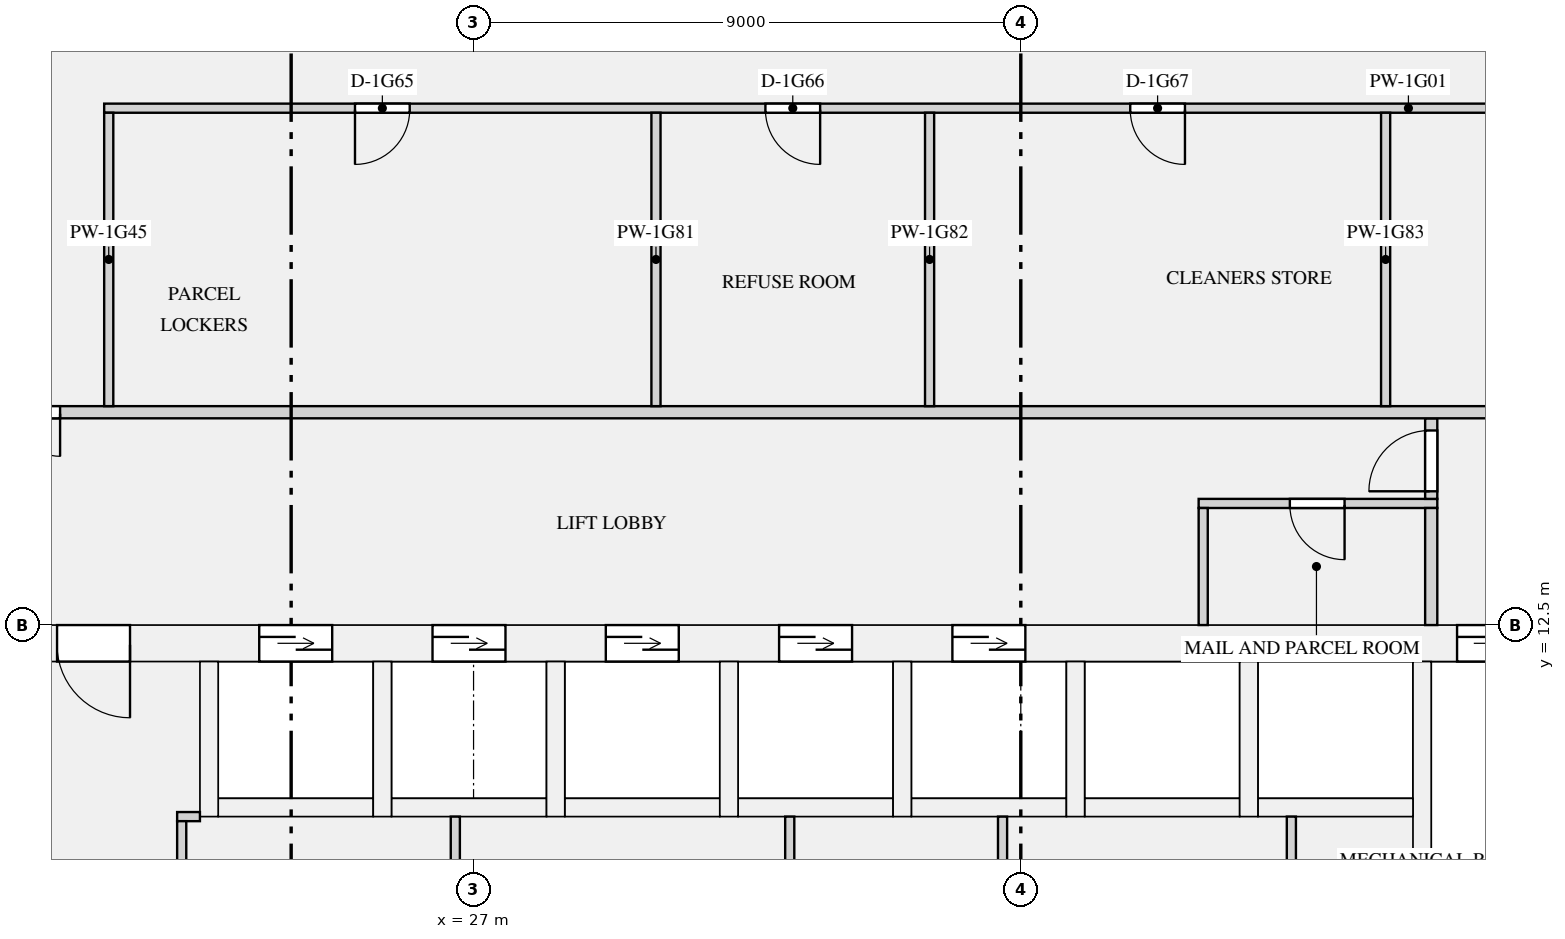
"""IFC4 building model, lengths in metres.
Left out: names, types, materials, properties, quantities, classifications, styles, units other than length and angle.
Written with IfcOpenShell. Run it as: python <this file> out.ifc"""

import sys

from ifc_helpers import new_model, si_unit, direction, frame, frame_2d, origin, place, context, subcontext, project, spatial, rectangle, extrude, element, fill, save


model = new_model("IFC4")
c1 = context("Model", 3, precision=1e-05, world=origin(), true_north=direction((0.0, 1.0)))
c2 = subcontext(c1, "Body", "Model", "MODEL_VIEW")
j1 = project(units=[si_unit("LENGTHUNIT", "METRE"), si_unit("PLANEANGLEUNIT", "RADIAN")], contexts=[c1])
p1 = place(None, origin())
s1 = spatial("IfcSite", under=j1, at=p1, CompositionType="ELEMENT")
p2 = place(p1, origin())
s2 = spatial("IfcBuilding", under=s1, at=p2, CompositionType="ELEMENT")
p3 = place(p2, frame((0.0, 0.0, 69.9)))
s3 = spatial("IfcBuildingStorey", under=s2, at=p3, CompositionType="ELEMENT", Elevation=69.9)
p4 = place(p3, frame((19.0, 12.2, 0.0), z_axis=(0.0, 0.0, 1.0), x_axis=(1.0, 0.0, 0.0)))
e1 = element("IfcWall", 1, at=p4, inside=s3, PredefinedType="SHEAR", context=c2, shape_type="SweptSolid", body=[
    extrude(rectangle(XDim=34.0, YDim=0.6, at=frame_2d((17.0, 0.0))), origin(), (0.0, 0.0, 1.0), 3.15),
])
p5 = place(p4, frame((4.475, 0.0, 0.0)))
e2 = element("IfcOpeningElement", 2, at=p5, cuts=e1, PredefinedType="OPENING", context=c2, shape_type="SweptSolid", body=[
    extrude(rectangle(XDim=1.2, YDim=2.1, at=frame_2d((0.6, 1.05))), frame((0.0, 0.31, 0.0), z_axis=(0.0, -1.0, 0.0), x_axis=(1.0, 0.0, 0.0)), (0.0, 0.0, 1.0), 0.62),
])
p6 = place(p4, frame((7.325, 0.0, 0.0)))
e3 = element("IfcOpeningElement", 3, at=p6, cuts=e1, PredefinedType="OPENING", context=c2, shape_type="SweptSolid", body=[
    extrude(rectangle(XDim=1.2, YDim=2.1, at=frame_2d((0.6, 1.05))), frame((0.0, 0.31, 0.0), z_axis=(0.0, -1.0, 0.0), x_axis=(1.0, 0.0, 0.0)), (0.0, 0.0, 1.0), 0.62),
])
p7 = place(p4, frame((10.175, 0.0, 0.0)))
e4 = element("IfcOpeningElement", 4, at=p7, cuts=e1, PredefinedType="OPENING", context=c2, shape_type="SweptSolid", body=[
    extrude(rectangle(XDim=1.2, YDim=2.1, at=frame_2d((0.6, 1.05))), frame((0.0, 0.31, 0.0), z_axis=(0.0, -1.0, 0.0), x_axis=(1.0, 0.0, 0.0)), (0.0, 0.0, 1.0), 0.62),
])
p8 = place(p4, frame((13.025, 0.0, 0.0)))
e5 = element("IfcOpeningElement", 5, at=p8, cuts=e1, PredefinedType="OPENING", context=c2, shape_type="SweptSolid", body=[
    extrude(rectangle(XDim=1.2, YDim=2.1, at=frame_2d((0.6, 1.05))), frame((0.0, 0.31, 0.0), z_axis=(0.0, -1.0, 0.0), x_axis=(1.0, 0.0, 0.0)), (0.0, 0.0, 1.0), 0.62),
])
p9 = place(p4, frame((15.875, 0.0, 0.0)))
e6 = element("IfcOpeningElement", 6, at=p9, cuts=e1, PredefinedType="OPENING", context=c2, shape_type="SweptSolid", body=[
    extrude(rectangle(XDim=1.2, YDim=2.1, at=frame_2d((0.6, 1.05))), frame((0.0, 0.31, 0.0), z_axis=(0.0, -1.0, 0.0), x_axis=(1.0, 0.0, 0.0)), (0.0, 0.0, 1.0), 0.62),
])
p10 = place(p4, frame((24.175, 0.0, 0.0)))
e7 = element("IfcOpeningElement", 7, at=p10, cuts=e1, PredefinedType="OPENING", context=c2, shape_type="SweptSolid", body=[
    extrude(rectangle(XDim=1.1, YDim=2.1, at=frame_2d((0.55, 1.05))), frame((0.0, 0.31, 0.0), z_axis=(0.0, -1.0, 0.0), x_axis=(1.0, 0.0, 0.0)), (0.0, 0.0, 1.0), 0.62),
])
p11 = place(p4, frame((26.425, 0.0, 0.0)))
e8 = element("IfcOpeningElement", 8, at=p11, cuts=e1, PredefinedType="OPENING", context=c2, shape_type="SweptSolid", body=[
    extrude(rectangle(XDim=1.1, YDim=2.1, at=frame_2d((0.55, 1.05))), frame((0.0, 0.31, 0.0), z_axis=(0.0, -1.0, 0.0), x_axis=(1.0, 0.0, 0.0)), (0.0, 0.0, 1.0), 0.62),
])
p12 = place(p4, frame((28.675, 0.0, 0.0)))
e9 = element("IfcOpeningElement", 9, at=p12, cuts=e1, PredefinedType="OPENING", context=c2, shape_type="SweptSolid", body=[
    extrude(rectangle(XDim=1.1, YDim=2.1, at=frame_2d((0.55, 1.05))), frame((0.0, 0.31, 0.0), z_axis=(0.0, -1.0, 0.0), x_axis=(1.0, 0.0, 0.0)), (0.0, 0.0, 1.0), 0.62),
])
p13 = place(p4, frame((1.15, 0.0, 0.0)))
e10 = element("IfcOpeningElement", 10, at=p13, cuts=e1, PredefinedType="OPENING", context=c2, shape_type="SweptSolid", body=[
    extrude(rectangle(XDim=1.2, YDim=2.1, at=frame_2d((0.6, 1.05))), frame((0.0, 0.31, 0.0), z_axis=(0.0, -1.0, 0.0), x_axis=(1.0, 0.0, 0.0)), (0.0, 0.0, 1.0), 0.62),
])
p14 = place(p4, frame((31.65, 0.0, 0.0)))
e11 = element("IfcOpeningElement", 11, at=p14, cuts=e1, PredefinedType="OPENING", context=c2, shape_type="SweptSolid", body=[
    extrude(rectangle(XDim=1.2, YDim=2.1, at=frame_2d((0.6, 1.05))), frame((0.0, 0.31, 0.0), z_axis=(0.0, -1.0, 0.0), x_axis=(1.0, 0.0, 0.0)), (0.0, 0.0, 1.0), 0.62),
])
p15 = place(p3, frame((22.8, 9.5, 0.0), z_axis=(0.0, 0.0, 1.0), x_axis=(1.0, 0.0, 0.0)))
e12 = element("IfcWall", 12, at=p15, inside=s3, PredefinedType="SHEAR", context=c2, shape_type="SweptSolid", body=[
    extrude(rectangle(XDim=2.55, YDim=0.3, at=frame_2d((1.275, 0.0))), origin(), (0.0, 0.0, 1.0), 3.15),
])
p16 = place(p3, frame((22.65, 9.35, 0.0), z_axis=(0.0, 0.0, 1.0), x_axis=(0.0, 1.0, 0.0)))
e13 = element("IfcWall", 13, at=p16, inside=s3, PredefinedType="SHEAR", context=c2, shape_type="SweptSolid", body=[
    extrude(rectangle(XDim=2.55, YDim=0.3, at=frame_2d((1.275, 0.0))), origin(), (0.0, 0.0, 1.0), 3.15),
])
p17 = place(p3, frame((25.65, 9.5, 0.0), z_axis=(0.0, 0.0, 1.0), x_axis=(1.0, 0.0, 0.0)))
e14 = element("IfcWall", 14, at=p17, inside=s3, PredefinedType="SHEAR", context=c2, shape_type="SweptSolid", body=[
    extrude(rectangle(XDim=2.55, YDim=0.3, at=frame_2d((1.275, 0.0))), origin(), (0.0, 0.0, 1.0), 3.15),
])
p18 = place(p3, frame((25.5, 9.35, 0.0), z_axis=(0.0, 0.0, 1.0), x_axis=(0.0, 1.0, 0.0)))
e15 = element("IfcWall", 15, at=p18, inside=s3, PredefinedType="SHEAR", context=c2, shape_type="SweptSolid", body=[
    extrude(rectangle(XDim=2.55, YDim=0.3, at=frame_2d((1.275, 0.0))), origin(), (0.0, 0.0, 1.0), 3.15),
])
p19 = place(p3, frame((28.5, 9.5, 0.0), z_axis=(0.0, 0.0, 1.0), x_axis=(1.0, 0.0, 0.0)))
e16 = element("IfcWall", 16, at=p19, inside=s3, PredefinedType="SHEAR", context=c2, shape_type="SweptSolid", body=[
    extrude(rectangle(XDim=2.55, YDim=0.3, at=frame_2d((1.275, 0.0))), origin(), (0.0, 0.0, 1.0), 3.15),
])
for number, where, z_axis, x_axis in (
    (17, (28.35, 9.35, 0.0), (0.0, 0.0, 1.0), (0.0, 1.0, 0.0)),
    (18, (31.35, 9.5, 0.0), (0.0, 0.0, 1.0), (1.0, 0.0, 0.0)),
    (19, (31.2, 9.35, 0.0), (0.0, 0.0, 1.0), (0.0, 1.0, 0.0)),
):
    element("IfcWall", number, at=place(p3, frame(where, z_axis=z_axis, x_axis=x_axis)), inside=s3, PredefinedType="SHEAR", context=c2, shape_type="SweptSolid", body=[
        extrude(rectangle(XDim=2.55, YDim=0.3, at=frame_2d((1.275, 0.0))), origin(), (0.0, 0.0, 1.0), 3.15),
    ])
p20 = place(p3, frame((34.2, 9.5, 0.0), z_axis=(0.0, 0.0, 1.0), x_axis=(1.0, 0.0, 0.0)))
e20 = element("IfcWall", 20, at=p20, inside=s3, PredefinedType="SHEAR", context=c2, shape_type="SweptSolid", body=[
    extrude(rectangle(XDim=2.55, YDim=0.3, at=frame_2d((1.275, 0.0))), origin(), (0.0, 0.0, 1.0), 3.15),
])
p21 = place(p3, frame((34.05, 9.35, 0.0), z_axis=(0.0, 0.0, 1.0), x_axis=(0.0, 1.0, 0.0)))
e21 = element("IfcWall", 21, at=p21, inside=s3, PredefinedType="SHEAR", context=c2, shape_type="SweptSolid", body=[
    extrude(rectangle(XDim=2.55, YDim=0.3, at=frame_2d((1.275, 0.0))), origin(), (0.0, 0.0, 1.0), 3.15),
])
p22 = place(p3, frame((37.05, 9.5, 0.0), z_axis=(0.0, 0.0, 1.0), x_axis=(1.0, 0.0, 0.0)))
e22 = element("IfcWall", 22, at=p22, inside=s3, PredefinedType="SHEAR", context=c2, shape_type="SweptSolid", body=[
    extrude(rectangle(XDim=2.55, YDim=0.3, at=frame_2d((1.275, 0.0))), origin(), (0.0, 0.0, 1.0), 3.15),
])
p23 = place(p3, frame((36.9, 9.35, 0.0), z_axis=(0.0, 0.0, 1.0), x_axis=(0.0, 1.0, 0.0)))
e23 = element("IfcWall", 23, at=p23, inside=s3, PredefinedType="SHEAR", context=c2, shape_type="SweptSolid", body=[
    extrude(rectangle(XDim=2.55, YDim=0.3, at=frame_2d((1.275, 0.0))), origin(), (0.0, 0.0, 1.0), 3.15),
])
p24 = place(p3, frame((39.9, 9.5, 0.0), z_axis=(0.0, 0.0, 1.0), x_axis=(1.0, 0.0, 0.0)))
e24 = element("IfcWall", 24, at=p24, inside=s3, PredefinedType="SHEAR", context=c2, shape_type="SweptSolid", body=[
    extrude(rectangle(XDim=2.55, YDim=0.3, at=frame_2d((1.275, 0.0))), origin(), (0.0, 0.0, 1.0), 3.15),
])
p25 = place(p3, frame((39.75, 9.35, 0.0), z_axis=(0.0, 0.0, 1.0), x_axis=(0.0, 1.0, 0.0)))
e25 = element("IfcWall", 25, at=p25, inside=s3, PredefinedType="SHEAR", context=c2, shape_type="SweptSolid", body=[
    extrude(rectangle(XDim=2.55, YDim=0.3, at=frame_2d((1.275, 0.0))), origin(), (0.0, 0.0, 1.0), 3.15),
])
p26 = place(p3, frame((42.6, 8.25, 0.0), z_axis=(0.0, 0.0, 1.0), x_axis=(0.0, 1.0, 0.0)))
e26 = element("IfcWall", 26, at=p26, inside=s3, PredefinedType="SHEAR", context=c2, shape_type="SweptSolid", body=[
    extrude(rectangle(XDim=3.65, YDim=0.3, at=frame_2d((1.825, 0.0))), origin(), (0.0, 0.0, 1.0), 3.15),
])
p27 = place(p3, frame((22.125, 9.35, 0.0), z_axis=(0.0, 0.0, 1.0), x_axis=(1.0, 0.0, 0.0)))
e27 = element("IfcWall", 27, at=p27, inside=s3, PredefinedType="PARTITIONING", context=c2, shape_type="SweptSolid", body=[
    extrude(rectangle(XDim=0.375, YDim=0.15, at=frame_2d((0.188, 0.0))), origin(), (0.0, 0.0, 1.0), 2.65),
])
p28 = place(p3, frame((38.925, 14.5, 0.0), z_axis=(0.0, 0.0, 1.0), x_axis=(1.0, 0.0, 0.0)))
e28 = element("IfcWall", 28, at=p28, inside=s3, PredefinedType="PARTITIONING", context=c2, shape_type="SweptSolid", body=[
    extrude(rectangle(XDim=3.925, YDim=0.15, at=frame_2d((1.962, 0.0))), origin(), (0.0, 0.0, 1.0), 2.65),
])
p29 = place(p28, frame((1.5, 0.0, 0.0)))
e29 = element("IfcOpeningElement", 29, at=p29, cuts=e28, PredefinedType="OPENING", context=c2, shape_type="SweptSolid", body=[
    extrude(rectangle(XDim=0.9, YDim=2.1, at=frame_2d((0.45, 1.05))), frame((0.0, 0.085, 0.0), z_axis=(0.0, -1.0, 0.0), x_axis=(1.0, 0.0, 0.0)), (0.0, 0.0, 1.0), 0.17),
])
p30 = place(p3, frame((22.2, 6.725, 0.0), z_axis=(0.0, 0.0, 1.0), x_axis=(0.0, 1.0, 0.0)))
e30 = element("IfcWall", 30, at=p30, inside=s3, PredefinedType="PARTITIONING", context=c2, shape_type="SweptSolid", body=[
    extrude(rectangle(XDim=2.55, YDim=0.15, at=frame_2d((1.275, 0.0))), origin(), (0.0, 0.0, 1.0), 2.65),
])
for number, where, z_axis, x_axis in (
    (31, (26.7, 6.725, 0.0), (0.0, 0.0, 1.0), (0.0, 1.0, 0.0)),
    (32, (32.2, 6.725, 0.0), (0.0, 0.0, 1.0), (0.0, 1.0, 0.0)),
    (33, (35.7, 6.725, 0.0), (0.0, 0.0, 1.0), (0.0, 1.0, 0.0)),
    (34, (40.45, 6.725, 0.0), (0.0, 0.0, 1.0), (0.0, 1.0, 0.0)),
):
    element("IfcWall", number, at=place(p3, frame(where, z_axis=z_axis, x_axis=x_axis)), inside=s3, PredefinedType="PARTITIONING", context=c2, shape_type="SweptSolid", body=[
        extrude(rectangle(XDim=2.625, YDim=0.15, at=frame_2d((1.312, 0.0))), origin(), (0.0, 0.0, 1.0), 2.65),
    ])
p31 = place(p3, frame((39.0, 12.5, 0.0), z_axis=(0.0, 0.0, 1.0), x_axis=(0.0, 1.0, 0.0)))
e35 = element("IfcWall", 35, at=p31, inside=s3, PredefinedType="PARTITIONING", context=c2, shape_type="SweptSolid", body=[
    extrude(rectangle(XDim=1.925, YDim=0.15, at=frame_2d((0.962, 0.0))), origin(), (0.0, 0.0, 1.0), 2.65),
])
p32 = place(p3, frame((42.75, 12.5, 0.0), z_axis=(0.0, 0.0, 1.0), x_axis=(0.0, 1.0, 0.0)))
e36 = element("IfcWall", 36, at=p32, inside=s3, PredefinedType="PARTITIONING", context=c2, shape_type="SweptSolid", body=[
    extrude(rectangle(XDim=1.925, YDim=0.2, at=frame_2d((0.962, 0.0))), origin(), (0.0, 0.0, 1.0), 2.65),
])
p33 = place(p3, frame((42.75, 14.575, 0.0), z_axis=(0.0, 0.0, 1.0), x_axis=(0.0, 1.0, 0.0)))
e37 = element("IfcWall", 37, at=p33, inside=s3, PredefinedType="PARTITIONING", context=c2, shape_type="SweptSolid", body=[
    extrude(rectangle(XDim=1.325, YDim=0.2, at=frame_2d((0.663, 0.0))), origin(), (0.0, 0.0, 1.0), 2.65),
])
p34 = place(p33, frame((0.125, 0.0, 0.0)))
e38 = element("IfcOpeningElement", 38, at=p34, cuts=e37, PredefinedType="OPENING", context=c2, shape_type="SweptSolid", body=[
    extrude(rectangle(XDim=1.0, YDim=2.1, at=frame_2d((0.5, 1.05))), frame((0.0, 0.11, 0.0), z_axis=(0.0, -1.0, 0.0), x_axis=(1.0, 0.0, 0.0)), (0.0, 0.0, 1.0), 0.22),
])
p35 = place(p3, frame((20.925, 21.0, 0.0), z_axis=(0.0, 0.0, 1.0), x_axis=(1.0, 0.0, 0.0)))
e39 = element("IfcWall", 39, at=p35, inside=s3, PredefinedType="PARTITIONING", context=c2, shape_type="SweptSolid", body=[
    extrude(rectangle(XDim=30.15, YDim=0.15, at=frame_2d((15.075, 0.0))), origin(), (0.0, 0.0, 1.0), 2.65),
])
p36 = place(p35, frame((4.125, 0.0, 0.0)))
e40 = element("IfcOpeningElement", 40, at=p36, cuts=e39, PredefinedType="OPENING", context=c2, shape_type="SweptSolid", body=[
    extrude(rectangle(XDim=0.9, YDim=2.1, at=frame_2d((0.45, 1.05))), frame((0.0, 0.085, 0.0), z_axis=(0.0, -1.0, 0.0), x_axis=(1.0, 0.0, 0.0)), (0.0, 0.0, 1.0), 0.17),
])
p37 = place(p35, frame((10.875, 0.0, 0.0)))
e41 = element("IfcOpeningElement", 41, at=p37, cuts=e39, PredefinedType="OPENING", context=c2, shape_type="SweptSolid", body=[
    extrude(rectangle(XDim=0.9, YDim=2.1, at=frame_2d((0.45, 1.05))), frame((0.0, 0.085, 0.0), z_axis=(0.0, -1.0, 0.0), x_axis=(1.0, 0.0, 0.0)), (0.0, 0.0, 1.0), 0.17),
])
p38 = place(p35, frame((16.875, 0.0, 0.0)))
e42 = element("IfcOpeningElement", 42, at=p38, cuts=e39, PredefinedType="OPENING", context=c2, shape_type="SweptSolid", body=[
    extrude(rectangle(XDim=0.9, YDim=2.1, at=frame_2d((0.45, 1.05))), frame((0.0, 0.085, 0.0), z_axis=(0.0, -1.0, 0.0), x_axis=(1.0, 0.0, 0.0)), (0.0, 0.0, 1.0), 0.17),
])
p39 = place(p35, frame((25.125, 0.0, 0.0)))
e43 = element("IfcOpeningElement", 43, at=p39, cuts=e39, PredefinedType="OPENING", context=c2, shape_type="SweptSolid", body=[
    extrude(rectangle(XDim=0.9, YDim=2.1, at=frame_2d((0.45, 1.05))), frame((0.0, 0.085, 0.0), z_axis=(0.0, -1.0, 0.0), x_axis=(1.0, 0.0, 0.0)), (0.0, 0.0, 1.0), 0.17),
])
p40 = place(p3, frame((17.9, 16.0, 0.0), z_axis=(0.0, 0.0, 1.0), x_axis=(1.0, 0.0, 0.0)))
e44 = element("IfcWall", 44, at=p40, inside=s3, PredefinedType="PARTITIONING", context=c2, shape_type="SweptSolid", body=[
    extrude(rectangle(XDim=36.2, YDim=0.2, at=frame_2d((18.1, 0.0))), origin(), (0.0, 0.0, 1.0), 2.65),
])
p41 = place(p40, frame((0.9, 0.0, 0.0)))
e45 = element("IfcOpeningElement", 45, at=p41, cuts=e44, PredefinedType="OPENING", context=c2, shape_type="SweptSolid", body=[
    extrude(rectangle(XDim=1.4, YDim=2.1, at=frame_2d((0.7, 1.05))), frame((0.0, 0.11, 0.0), z_axis=(0.0, -1.0, 0.0), x_axis=(1.0, 0.0, 0.0)), (0.0, 0.0, 1.0), 0.22),
])
p42 = place(p40, frame((33.9, 0.0, 0.0)))
e46 = element("IfcOpeningElement", 46, at=p42, cuts=e44, PredefinedType="OPENING", context=c2, shape_type="SweptSolid", body=[
    extrude(rectangle(XDim=1.4, YDim=2.1, at=frame_2d((0.7, 1.05))), frame((0.0, 0.11, 0.0), z_axis=(0.0, -1.0, 0.0), x_axis=(1.0, 0.0, 0.0)), (0.0, 0.0, 1.0), 0.22),
])
for number, where, z_axis, x_axis in (
    (47, (21.0, 16.1, 0.0), (0.0, 0.0, 1.0), (0.0, 1.0, 0.0)),
    (48, (30.0, 16.1, 0.0), (0.0, 0.0, 1.0), (0.0, 1.0, 0.0)),
    (49, (34.5, 16.1, 0.0), (0.0, 0.0, 1.0), (0.0, 1.0, 0.0)),
    (50, (42.0, 16.1, 0.0), (0.0, 0.0, 1.0), (0.0, 1.0, 0.0)),
):
    element("IfcWall", number, at=place(p3, frame(where, z_axis=z_axis, x_axis=x_axis)), inside=s3, PredefinedType="PARTITIONING", context=c2, shape_type="SweptSolid", body=[
        extrude(rectangle(XDim=4.825, YDim=0.15, at=frame_2d((2.413, 0.0))), origin(), (0.0, 0.0, 1.0), 2.65),
    ])
p43 = place(p5, origin())
e51 = element("IfcDoor", 51, at=p43, inside=s3, OperationType="DOUBLE_DOOR_SLIDING", PredefinedType="DOOR", context=c2, shape_type="SweptSolid", body=[
    extrude(rectangle(XDim=1.2, YDim=2.1, at=frame_2d((0.6, 1.05))), frame((0.0, 0.025, 0.0), z_axis=(0.0, -1.0, 0.0), x_axis=(1.0, 0.0, 0.0)), (0.0, 0.0, 1.0), 0.05),
])
fill(e2, e51)
p44 = place(p6, origin())
e52 = element("IfcDoor", 52, at=p44, inside=s3, OperationType="DOUBLE_DOOR_SLIDING", PredefinedType="DOOR", context=c2, shape_type="SweptSolid", body=[
    extrude(rectangle(XDim=1.2, YDim=2.1, at=frame_2d((0.6, 1.05))), frame((0.0, 0.025, 0.0), z_axis=(0.0, -1.0, 0.0), x_axis=(1.0, 0.0, 0.0)), (0.0, 0.0, 1.0), 0.05),
])
fill(e3, e52)
p45 = place(p7, origin())
e53 = element("IfcDoor", 53, at=p45, inside=s3, OperationType="DOUBLE_DOOR_SLIDING", PredefinedType="DOOR", context=c2, shape_type="SweptSolid", body=[
    extrude(rectangle(XDim=1.2, YDim=2.1, at=frame_2d((0.6, 1.05))), frame((0.0, 0.025, 0.0), z_axis=(0.0, -1.0, 0.0), x_axis=(1.0, 0.0, 0.0)), (0.0, 0.0, 1.0), 0.05),
])
fill(e4, e53)
p46 = place(p8, origin())
e54 = element("IfcDoor", 54, at=p46, inside=s3, OperationType="DOUBLE_DOOR_SLIDING", PredefinedType="DOOR", context=c2, shape_type="SweptSolid", body=[
    extrude(rectangle(XDim=1.2, YDim=2.1, at=frame_2d((0.6, 1.05))), frame((0.0, 0.025, 0.0), z_axis=(0.0, -1.0, 0.0), x_axis=(1.0, 0.0, 0.0)), (0.0, 0.0, 1.0), 0.05),
])
fill(e5, e54)
p47 = place(p9, origin())
e55 = element("IfcDoor", 55, at=p47, inside=s3, OperationType="DOUBLE_DOOR_SLIDING", PredefinedType="DOOR", context=c2, shape_type="SweptSolid", body=[
    extrude(rectangle(XDim=1.2, YDim=2.1, at=frame_2d((0.6, 1.05))), frame((0.0, 0.025, 0.0), z_axis=(0.0, -1.0, 0.0), x_axis=(1.0, 0.0, 0.0)), (0.0, 0.0, 1.0), 0.05),
])
fill(e6, e55)
p48 = place(p10, origin())
e56 = element("IfcDoor", 56, at=p48, inside=s3, OperationType="DOUBLE_DOOR_SLIDING", PredefinedType="DOOR", context=c2, shape_type="SweptSolid", body=[
    extrude(rectangle(XDim=1.1, YDim=2.1, at=frame_2d((0.55, 1.05))), frame((0.0, 0.025, 0.0), z_axis=(0.0, -1.0, 0.0), x_axis=(1.0, 0.0, 0.0)), (0.0, 0.0, 1.0), 0.05),
])
fill(e7, e56)
p49 = place(p29, frame((0.9, 0.0, 0.0), z_axis=(0.0, 0.0, 1.0), x_axis=(-1.0, 0.0, 0.0)))
e57 = element("IfcDoor", 57, at=p49, inside=s3, OperationType="SINGLE_SWING_LEFT", PredefinedType="DOOR", context=c2, shape_type="SweptSolid", body=[
    extrude(rectangle(XDim=0.9, YDim=2.1, at=frame_2d((0.45, 1.05))), frame((0.0, 0.025, 0.0), z_axis=(0.0, -1.0, 0.0), x_axis=(1.0, 0.0, 0.0)), (0.0, 0.0, 1.0), 0.05),
])
fill(e29, e57)
p50 = place(p13, frame((1.2, 0.0, 0.0), z_axis=(0.0, 0.0, 1.0), x_axis=(-1.0, 0.0, 0.0)))
e58 = element("IfcDoor", 58, at=p50, inside=s3, OperationType="SINGLE_SWING_LEFT", PredefinedType="DOOR", context=c2, shape_type="SweptSolid", body=[
    extrude(rectangle(XDim=1.2, YDim=2.1, at=frame_2d((0.6, 1.05))), frame((0.0, 0.025, 0.0), z_axis=(0.0, -1.0, 0.0), x_axis=(1.0, 0.0, 0.0)), (0.0, 0.0, 1.0), 0.05),
])
fill(e10, e58)
p51 = place(p34, origin())
e59 = element("IfcDoor", 59, at=p51, inside=s3, OperationType="SINGLE_SWING_LEFT", PredefinedType="DOOR", context=c2, shape_type="SweptSolid", body=[
    extrude(rectangle(XDim=1.0, YDim=2.1, at=frame_2d((0.5, 1.05))), frame((0.0, 0.025, 0.0), z_axis=(0.0, -1.0, 0.0), x_axis=(1.0, 0.0, 0.0)), (0.0, 0.0, 1.0), 0.05),
])
fill(e38, e59)
p52 = place(p41, frame((1.4, 0.0, 0.0), z_axis=(0.0, 0.0, 1.0), x_axis=(-1.0, 0.0, 0.0)))
e60 = element("IfcDoor", 60, at=p52, inside=s3, OperationType="DOUBLE_DOOR_SINGLE_SWING", PredefinedType="DOOR", context=c2, shape_type="SweptSolid", body=[
    extrude(rectangle(XDim=1.4, YDim=2.1, at=frame_2d((0.7, 1.05))), frame((0.0, 0.025, 0.0), z_axis=(0.0, -1.0, 0.0), x_axis=(1.0, 0.0, 0.0)), (0.0, 0.0, 1.0), 0.05),
])
fill(e45, e60)
p53 = place(p36, frame((0.9, 0.0, 0.0), z_axis=(0.0, 0.0, 1.0), x_axis=(-1.0, 0.0, 0.0)))
e61 = element("IfcDoor", 61, at=p53, inside=s3, OperationType="SINGLE_SWING_RIGHT", PredefinedType="DOOR", context=c2, shape_type="SweptSolid", body=[
    extrude(rectangle(XDim=0.9, YDim=2.1, at=frame_2d((0.45, 1.05))), frame((0.0, 0.025, 0.0), z_axis=(0.0, -1.0, 0.0), x_axis=(1.0, 0.0, 0.0)), (0.0, 0.0, 1.0), 0.05),
])
fill(e40, e61)
p54 = place(p37, frame((0.9, 0.0, 0.0), z_axis=(0.0, 0.0, 1.0), x_axis=(-1.0, 0.0, 0.0)))
e62 = element("IfcDoor", 62, at=p54, inside=s3, OperationType="SINGLE_SWING_LEFT", PredefinedType="DOOR", context=c2, shape_type="SweptSolid", body=[
    extrude(rectangle(XDim=0.9, YDim=2.1, at=frame_2d((0.45, 1.05))), frame((0.0, 0.025, 0.0), z_axis=(0.0, -1.0, 0.0), x_axis=(1.0, 0.0, 0.0)), (0.0, 0.0, 1.0), 0.05),
])
fill(e41, e62)
p55 = place(p38, frame((0.9, 0.0, 0.0), z_axis=(0.0, 0.0, 1.0), x_axis=(-1.0, 0.0, 0.0)))
e63 = element("IfcDoor", 63, at=p55, inside=s3, OperationType="SINGLE_SWING_LEFT", PredefinedType="DOOR", context=c2, shape_type="SweptSolid", body=[
    extrude(rectangle(XDim=0.9, YDim=2.1, at=frame_2d((0.45, 1.05))), frame((0.0, 0.025, 0.0), z_axis=(0.0, -1.0, 0.0), x_axis=(1.0, 0.0, 0.0)), (0.0, 0.0, 1.0), 0.05),
])
fill(e42, e63)
save(model, sys.argv[1])
